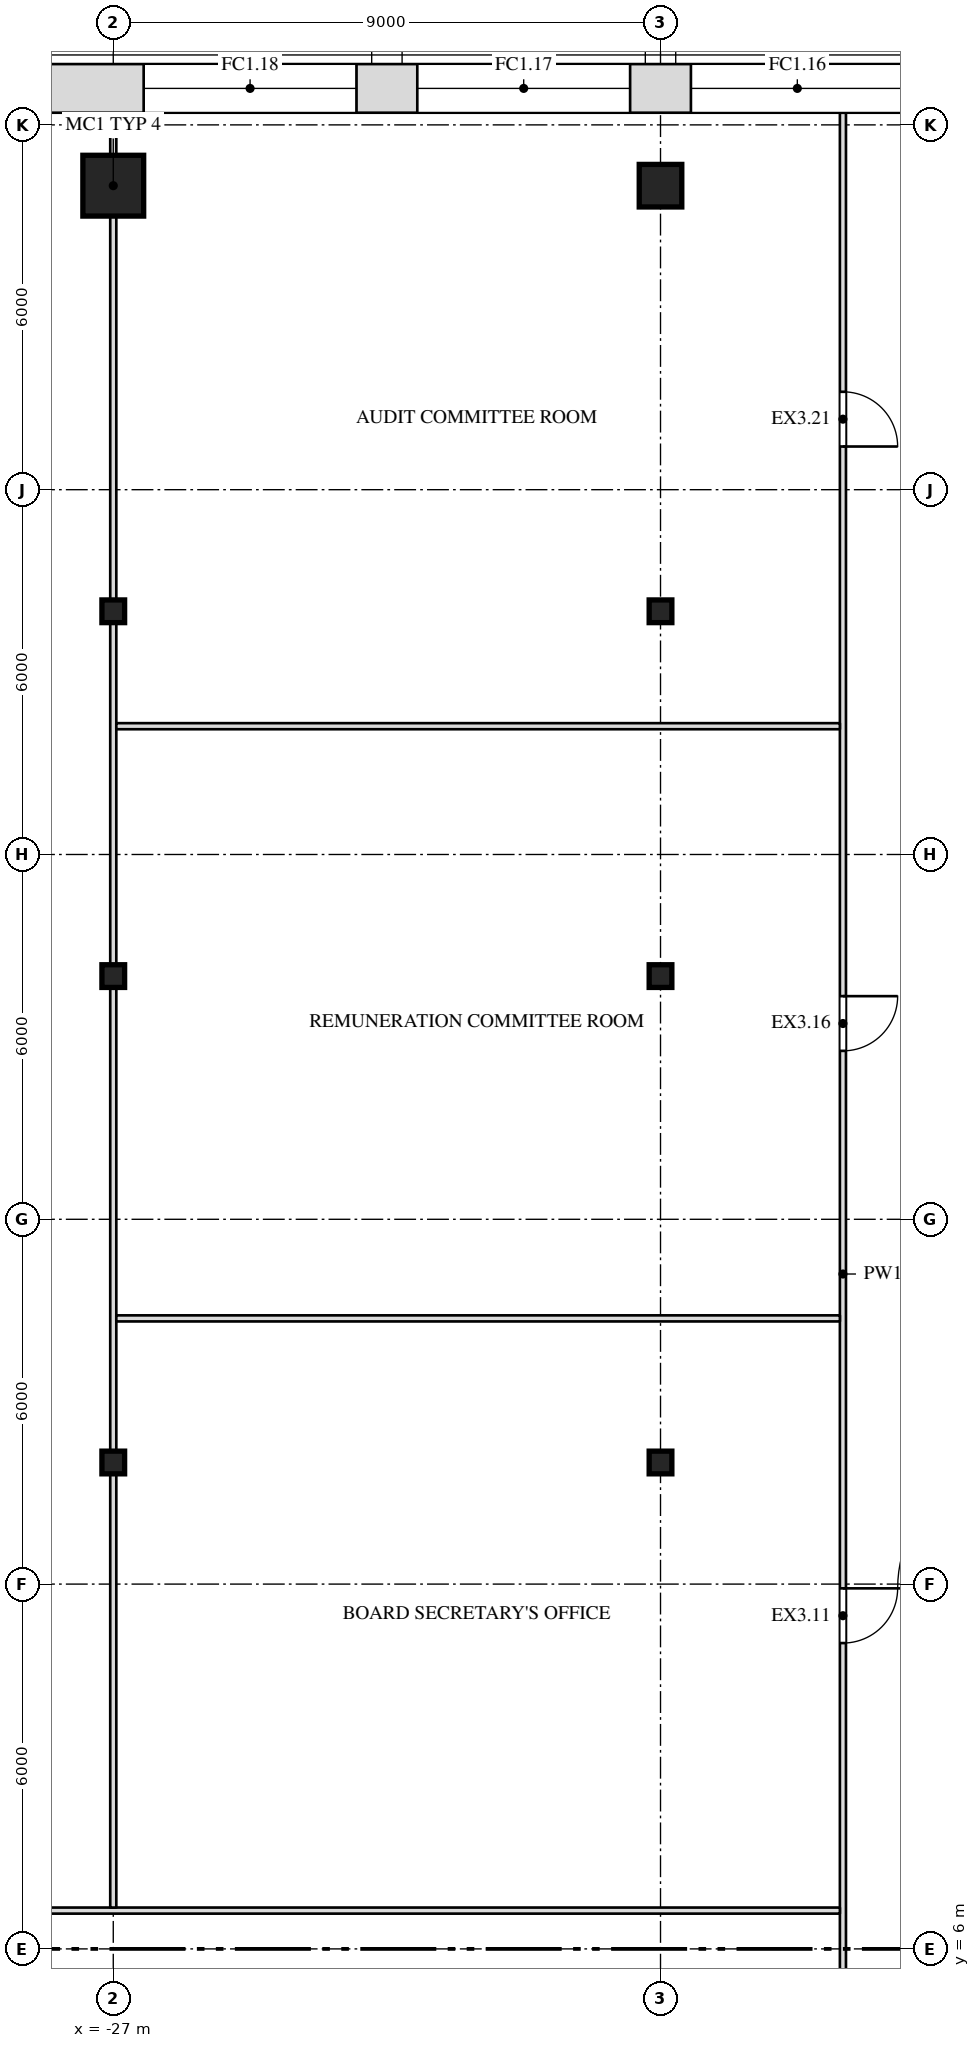
"""IFC4 building model, lengths in metres.
Left out: names, types, materials, properties, quantities, classifications, styles, units other than length and angle.
Written with IfcOpenShell. Run it as: python <this file> out.ifc"""

import sys

from ifc_helpers import new_model, si_unit, direction, frame, frame_2d, origin, origin_2d, place, context, subcontext, project, spatial, rectangle, i_section, extrude, element, fill, save


model = new_model("IFC4")
c1 = context("Model", 3, precision=1e-05, world=origin(), true_north=direction((0.0, 1.0)))
c2 = subcontext(c1, "Body", "Model", "MODEL_VIEW")
j1 = project(units=[si_unit("LENGTHUNIT", "METRE"), si_unit("PLANEANGLEUNIT", "RADIAN")], contexts=[c1])
p1 = place(None, origin())
s1 = spatial("IfcSite", under=j1, at=p1, CompositionType="ELEMENT")
p2 = place(p1, origin())
s2 = spatial("IfcBuilding", under=s1, at=p2, CompositionType="ELEMENT")
p3 = place(p2, frame((0.0, 0.0, 280.5)))
s3 = spatial("IfcBuildingStorey", under=s2, at=p3, CompositionType="ELEMENT", Elevation=280.5)
for number, where, z_axis, x_axis in (
    (1, (-27.0, 14.0, 0.0), (0.0, 0.0, 1.0), (1.0, 0.0, 0.0)),
    (2, (-18.0, 14.0, 0.0), (0.0, 0.0, 1.0), (1.0, 0.0, 0.0)),
    (3, (-27.0, 22.0, 0.0), (0.0, 0.0, 1.0), (1.0, 0.0, 0.0)),
    (4, (-18.0, 22.0, 0.0), (0.0, 0.0, 1.0), (1.0, 0.0, 0.0)),
    (5, (-27.0, 28.0, 0.0), (0.0, 0.0, 1.0), (1.0, 0.0, 0.0)),
    (6, (-18.0, 28.0, 0.0), (0.0, 0.0, 1.0), (1.0, 0.0, 0.0)),
):
    element("IfcColumn", number, at=place(p3, frame(where, z_axis=z_axis, x_axis=x_axis)), inside=s3, PredefinedType="COLUMN", context=c2, shape_type="SweptSolid", body=[
        extrude(i_section(OverallWidth=0.373, OverallDepth=0.373, WebThickness=0.016, FlangeThickness=0.026, at=origin_2d()), origin(), (0.0, 0.0, 1.0), 4.0),
    ])
p4 = place(p3, frame((-27.0, 35.0, 0.0), z_axis=(0.0, 0.0, 1.0), x_axis=(1.0, 0.0, 0.0)))
e7 = element("IfcColumn", 7, at=p4, inside=s3, PredefinedType="COLUMN", context=c2, shape_type="SweptSolid", body=[
    extrude(rectangle(XDim=1.0, YDim=1.0, at=origin_2d()), origin(), (0.0, 0.0, 1.0), 4.0),
])
p5 = place(p3, frame((-18.0, 35.0, 0.0), z_axis=(0.0, 0.0, 1.0), x_axis=(1.0, 0.0, 0.0)))
e8 = element("IfcColumn", 8, at=p5, inside=s3, PredefinedType="COLUMN", context=c2, shape_type="SweptSolid", body=[
    extrude(rectangle(XDim=0.7, YDim=0.7, at=origin_2d()), origin(), (0.0, 0.0, 1.0), 4.0),
])
p6 = place(p3, frame((-15.0, -2.0, 0.0), z_axis=(0.0, 0.0, 1.0), x_axis=(0.0, 1.0, 0.0)))
e9 = element("IfcWall", 9, at=p6, inside=s3, PredefinedType="PARTITIONING", context=c2, shape_type="SweptSolid", body=[
    extrude(rectangle(XDim=38.2, YDim=0.1, at=frame_2d((19.1, 0.0))), origin(), (0.0, 0.0, 1.0), 3.78),
])
p7 = place(p6, frame((13.03, 0.0, 0.0)))
e10 = element("IfcOpeningElement", 10, at=p7, cuts=e9, PredefinedType="OPENING", context=c2, shape_type="SweptSolid", body=[
    extrude(rectangle(XDim=0.9, YDim=2.1, at=frame_2d((0.45, 1.05))), frame((0.0, 0.062, 0.0), z_axis=(0.0, -1.0, 0.0), x_axis=(1.0, 0.0, 0.0)), (0.0, 0.0, 1.0), 0.124),
])
p8 = place(p6, frame((22.77, 0.0, 0.0)))
e11 = element("IfcOpeningElement", 11, at=p8, cuts=e9, PredefinedType="OPENING", context=c2, shape_type="SweptSolid", body=[
    extrude(rectangle(XDim=0.9, YDim=2.1, at=frame_2d((0.45, 1.05))), frame((0.0, 0.062, 0.0), z_axis=(0.0, -1.0, 0.0), x_axis=(1.0, 0.0, 0.0)), (0.0, 0.0, 1.0), 0.124),
])
p9 = place(p6, frame((32.71, 0.0, 0.0)))
e12 = element("IfcOpeningElement", 12, at=p9, cuts=e9, PredefinedType="OPENING", context=c2, shape_type="SweptSolid", body=[
    extrude(rectangle(XDim=0.9, YDim=2.1, at=frame_2d((0.45, 1.05))), frame((0.0, 0.062, 0.0), z_axis=(0.0, -1.0, 0.0), x_axis=(1.0, 0.0, 0.0)), (0.0, 0.0, 1.0), 0.124),
])
p10 = place(p3, frame((-35.2, 6.63, 0.0), z_axis=(0.0, 0.0, 1.0), x_axis=(1.0, 0.0, 0.0)))
e13 = element("IfcWall", 13, at=p10, inside=s3, PredefinedType="PARTITIONING", context=c2, shape_type="SweptSolid", body=[
    extrude(rectangle(XDim=20.15, YDim=0.1, at=frame_2d((10.075, 0.0))), origin(), (0.0, 0.0, 1.0), 3.78),
])
p11 = place(p10, frame((3.65, 0.0, 0.0)))
e14 = element("IfcOpeningElement", 14, at=p11, cuts=e13, PredefinedType="OPENING", context=c2, shape_type="SweptSolid", body=[
    extrude(rectangle(XDim=0.9, YDim=2.1, at=frame_2d((0.45, 1.05))), frame((0.0, 0.062, 0.0), z_axis=(0.0, -1.0, 0.0), x_axis=(1.0, 0.0, 0.0)), (0.0, 0.0, 1.0), 0.124),
])
p12 = place(p3, frame((-27.0, 6.68, 0.0), z_axis=(0.0, 0.0, 1.0), x_axis=(0.0, 1.0, 0.0)))
e15 = element("IfcWall", 15, at=p12, inside=s3, PredefinedType="PARTITIONING", context=c2, shape_type="SweptSolid", body=[
    extrude(rectangle(XDim=7.133, YDim=0.1, at=frame_2d((3.567, 0.0))), origin(), (0.0, 0.0, 1.0), 2.848),
])
p13 = place(p3, frame((-27.0, 14.187, 0.0), z_axis=(0.0, 0.0, 1.0), x_axis=(0.0, 1.0, 0.0)))
e16 = element("IfcWall", 16, at=p13, inside=s3, PredefinedType="PARTITIONING", context=c2, shape_type="SweptSolid", body=[
    extrude(rectangle(XDim=7.626, YDim=0.1, at=frame_2d((3.813, 0.0))), origin(), (0.0, 0.0, 1.0), 2.848),
])
p14 = place(p3, frame((-27.0, 22.187, 0.0), z_axis=(0.0, 0.0, 1.0), x_axis=(0.0, 1.0, 0.0)))
e17 = element("IfcWall", 17, at=p14, inside=s3, PredefinedType="PARTITIONING", context=c2, shape_type="SweptSolid", body=[
    extrude(rectangle(XDim=5.626, YDim=0.1, at=frame_2d((2.813, 0.0))), origin(), (0.0, 0.0, 1.0), 2.848),
])
p15 = place(p3, frame((-27.0, 28.187, 0.0), z_axis=(0.0, 0.0, 1.0), x_axis=(0.0, 1.0, 0.0)))
e18 = element("IfcWall", 18, at=p15, inside=s3, PredefinedType="PARTITIONING", context=c2, shape_type="SweptSolid", body=[
    extrude(rectangle(XDim=6.313, YDim=0.1, at=frame_2d((3.157, 0.0))), origin(), (0.0, 0.0, 1.0), 2.848),
])
p16 = place(p3, frame((-27.0, 35.5, 0.0), z_axis=(0.0, 0.0, 1.0), x_axis=(0.0, 1.0, 0.0)))
e19 = element("IfcWall", 19, at=p16, inside=s3, PredefinedType="PARTITIONING", context=c2, shape_type="SweptSolid", body=[
    extrude(rectangle(XDim=0.7, YDim=0.1, at=frame_2d((0.35, 0.0))), origin(), (0.0, 0.0, 1.0), 3.78),
])
for number, where, z_axis, x_axis in (
    (20, (-26.95, 16.37, 0.0), (0.0, 0.0, 1.0), (1.0, 0.0, 0.0)),
    (21, (-26.95, 26.11, 0.0), (0.0, 0.0, 1.0), (1.0, 0.0, 0.0)),
):
    element("IfcWall", number, at=place(p3, frame(where, z_axis=z_axis, x_axis=x_axis)), inside=s3, PredefinedType="PARTITIONING", context=c2, shape_type="SweptSolid", body=[
        extrude(rectangle(XDim=11.9, YDim=0.1, at=frame_2d((5.95, 0.0))), origin(), (0.0, 0.0, 1.0), 3.78),
    ])
p17 = place(p3, frame((29.948, 36.6, 0.0), z_axis=(0.0, 0.0, 1.0), x_axis=(-1.0, 0.0, 0.0)))
e22 = element("IfcWall", 22, at=p17, inside=s3, PredefinedType="SOLIDWALL", context=c2, shape_type="SweptSolid", body=[
    extrude(rectangle(XDim=59.895, YDim=0.8, at=frame_2d((29.948, 0.0))), origin(), (0.0, 0.0, 1.0), 3.78),
])
p18 = place(p17, frame((3.448, 0.0, 1.0)))
e23 = element("IfcOpeningElement", 23, at=p18, cuts=e22, PredefinedType="OPENING", context=c2, shape_type="SweptSolid", body=[
    extrude(rectangle(XDim=3.5, YDim=2.5, at=frame_2d((1.75, 1.25))), frame((0.0, 0.412, 0.0), z_axis=(0.0, -1.0, 0.0), x_axis=(1.0, 0.0, 0.0)), (0.0, 0.0, 1.0), 0.824),
])
p19 = place(p17, frame((7.948, 0.0, 1.0)))
e24 = element("IfcOpeningElement", 24, at=p19, cuts=e22, PredefinedType="OPENING", context=c2, shape_type="SweptSolid", body=[
    extrude(rectangle(XDim=3.5, YDim=2.5, at=frame_2d((1.75, 1.25))), frame((0.0, 0.412, 0.0), z_axis=(0.0, -1.0, 0.0), x_axis=(1.0, 0.0, 0.0)), (0.0, 0.0, 1.0), 0.824),
])
p20 = place(p17, frame((12.448, 0.0, 1.0)))
e25 = element("IfcOpeningElement", 25, at=p20, cuts=e22, PredefinedType="OPENING", context=c2, shape_type="SweptSolid", body=[
    extrude(rectangle(XDim=3.5, YDim=2.5, at=frame_2d((1.75, 1.25))), frame((0.0, 0.412, 0.0), z_axis=(0.0, -1.0, 0.0), x_axis=(1.0, 0.0, 0.0)), (0.0, 0.0, 1.0), 0.824),
])
p21 = place(p17, frame((16.948, 0.0, 1.0)))
e26 = element("IfcOpeningElement", 26, at=p21, cuts=e22, PredefinedType="OPENING", context=c2, shape_type="SweptSolid", body=[
    extrude(rectangle(XDim=3.5, YDim=2.5, at=frame_2d((1.75, 1.25))), frame((0.0, 0.412, 0.0), z_axis=(0.0, -1.0, 0.0), x_axis=(1.0, 0.0, 0.0)), (0.0, 0.0, 1.0), 0.824),
])
p22 = place(p17, frame((21.448, 0.0, 1.0)))
e27 = element("IfcOpeningElement", 27, at=p22, cuts=e22, PredefinedType="OPENING", context=c2, shape_type="SweptSolid", body=[
    extrude(rectangle(XDim=3.5, YDim=2.5, at=frame_2d((1.75, 1.25))), frame((0.0, 0.412, 0.0), z_axis=(0.0, -1.0, 0.0), x_axis=(1.0, 0.0, 0.0)), (0.0, 0.0, 1.0), 0.824),
])
p23 = place(p17, frame((25.948, 0.0, 1.0)))
e28 = element("IfcOpeningElement", 28, at=p23, cuts=e22, PredefinedType="OPENING", context=c2, shape_type="SweptSolid", body=[
    extrude(rectangle(XDim=3.5, YDim=2.5, at=frame_2d((1.75, 1.25))), frame((0.0, 0.412, 0.0), z_axis=(0.0, -1.0, 0.0), x_axis=(1.0, 0.0, 0.0)), (0.0, 0.0, 1.0), 0.824),
])
p24 = place(p17, frame((30.448, 0.0, 1.0)))
e29 = element("IfcOpeningElement", 29, at=p24, cuts=e22, PredefinedType="OPENING", context=c2, shape_type="SweptSolid", body=[
    extrude(rectangle(XDim=3.5, YDim=2.5, at=frame_2d((1.75, 1.25))), frame((0.0, 0.412, 0.0), z_axis=(0.0, -1.0, 0.0), x_axis=(1.0, 0.0, 0.0)), (0.0, 0.0, 1.0), 0.824),
])
p25 = place(p17, frame((34.948, 0.0, 1.0)))
e30 = element("IfcOpeningElement", 30, at=p25, cuts=e22, PredefinedType="OPENING", context=c2, shape_type="SweptSolid", body=[
    extrude(rectangle(XDim=3.5, YDim=2.5, at=frame_2d((1.75, 1.25))), frame((0.0, 0.412, 0.0), z_axis=(0.0, -1.0, 0.0), x_axis=(1.0, 0.0, 0.0)), (0.0, 0.0, 1.0), 0.824),
])
p26 = place(p17, frame((39.448, 0.0, 1.0)))
e31 = element("IfcOpeningElement", 31, at=p26, cuts=e22, PredefinedType="OPENING", context=c2, shape_type="SweptSolid", body=[
    extrude(rectangle(XDim=3.5, YDim=2.5, at=frame_2d((1.75, 1.25))), frame((0.0, 0.412, 0.0), z_axis=(0.0, -1.0, 0.0), x_axis=(1.0, 0.0, 0.0)), (0.0, 0.0, 1.0), 0.824),
])
p27 = place(p17, frame((43.948, 0.0, 1.0)))
e32 = element("IfcOpeningElement", 32, at=p27, cuts=e22, PredefinedType="OPENING", context=c2, shape_type="SweptSolid", body=[
    extrude(rectangle(XDim=3.5, YDim=2.5, at=frame_2d((1.75, 1.25))), frame((0.0, 0.412, 0.0), z_axis=(0.0, -1.0, 0.0), x_axis=(1.0, 0.0, 0.0)), (0.0, 0.0, 1.0), 0.824),
])
p28 = place(p17, frame((48.448, 0.0, 1.0)))
e33 = element("IfcOpeningElement", 33, at=p28, cuts=e22, PredefinedType="OPENING", context=c2, shape_type="SweptSolid", body=[
    extrude(rectangle(XDim=3.5, YDim=2.5, at=frame_2d((1.75, 1.25))), frame((0.0, 0.412, 0.0), z_axis=(0.0, -1.0, 0.0), x_axis=(1.0, 0.0, 0.0)), (0.0, 0.0, 1.0), 0.824),
])
p29 = place(p17, frame((52.948, 0.0, 1.0)))
e34 = element("IfcOpeningElement", 34, at=p29, cuts=e22, PredefinedType="OPENING", context=c2, shape_type="SweptSolid", body=[
    extrude(rectangle(XDim=3.5, YDim=2.5, at=frame_2d((1.75, 1.25))), frame((0.0, 0.412, 0.0), z_axis=(0.0, -1.0, 0.0), x_axis=(1.0, 0.0, 0.0)), (0.0, 0.0, 1.0), 0.824),
])
p30 = place(p7, origin())
e35 = element("IfcDoor", 35, at=p30, inside=s3, OperationType="SINGLE_SWING_LEFT", PredefinedType="DOOR", context=c2, shape_type="SweptSolid", body=[
    extrude(rectangle(XDim=0.9, YDim=2.1, at=frame_2d((0.45, 1.05))), frame((0.0, 0.025, 0.0), z_axis=(0.0, -1.0, 0.0), x_axis=(1.0, 0.0, 0.0)), (0.0, 0.0, 1.0), 0.05),
])
fill(e10, e35)
p31 = place(p8, origin())
e36 = element("IfcDoor", 36, at=p31, inside=s3, OperationType="SINGLE_SWING_LEFT", PredefinedType="DOOR", context=c2, shape_type="SweptSolid", body=[
    extrude(rectangle(XDim=0.9, YDim=2.1, at=frame_2d((0.45, 1.05))), frame((0.0, 0.025, 0.0), z_axis=(0.0, -1.0, 0.0), x_axis=(1.0, 0.0, 0.0)), (0.0, 0.0, 1.0), 0.05),
])
fill(e11, e36)
p32 = place(p9, origin())
e37 = element("IfcDoor", 37, at=p32, inside=s3, OperationType="SINGLE_SWING_RIGHT", PredefinedType="DOOR", context=c2, shape_type="SweptSolid", body=[
    extrude(rectangle(XDim=0.9, YDim=2.1, at=frame_2d((0.45, 1.05))), frame((0.0, 0.025, 0.0), z_axis=(0.0, -1.0, 0.0), x_axis=(1.0, 0.0, 0.0)), (0.0, 0.0, 1.0), 0.05),
])
fill(e12, e37)
p33 = place(p27, origin())
e38 = element("IfcWindow", 38, at=p33, inside=s3, PartitioningType="SINGLE_PANEL", PredefinedType="WINDOW", context=c2, shape_type="SweptSolid", body=[
    extrude(rectangle(XDim=3.5, YDim=2.5, at=frame_2d((1.75, 1.25))), frame((0.0, 0.03, 0.0), z_axis=(0.0, -1.0, 0.0), x_axis=(1.0, 0.0, 0.0)), (0.0, 0.0, 1.0), 0.06),
])
fill(e32, e38)
p34 = place(p28, origin())
e39 = element("IfcWindow", 39, at=p34, inside=s3, PartitioningType="SINGLE_PANEL", PredefinedType="WINDOW", context=c2, shape_type="SweptSolid", body=[
    extrude(rectangle(XDim=3.5, YDim=2.5, at=frame_2d((1.75, 1.25))), frame((0.0, 0.03, 0.0), z_axis=(0.0, -1.0, 0.0), x_axis=(1.0, 0.0, 0.0)), (0.0, 0.0, 1.0), 0.06),
])
fill(e33, e39)
p35 = place(p29, origin())
e40 = element("IfcWindow", 40, at=p35, inside=s3, PartitioningType="SINGLE_PANEL", PredefinedType="WINDOW", context=c2, shape_type="SweptSolid", body=[
    extrude(rectangle(XDim=3.5, YDim=2.5, at=frame_2d((1.75, 1.25))), frame((0.0, 0.03, 0.0), z_axis=(0.0, -1.0, 0.0), x_axis=(1.0, 0.0, 0.0)), (0.0, 0.0, 1.0), 0.06),
])
fill(e34, e40)
save(model, sys.argv[1])
